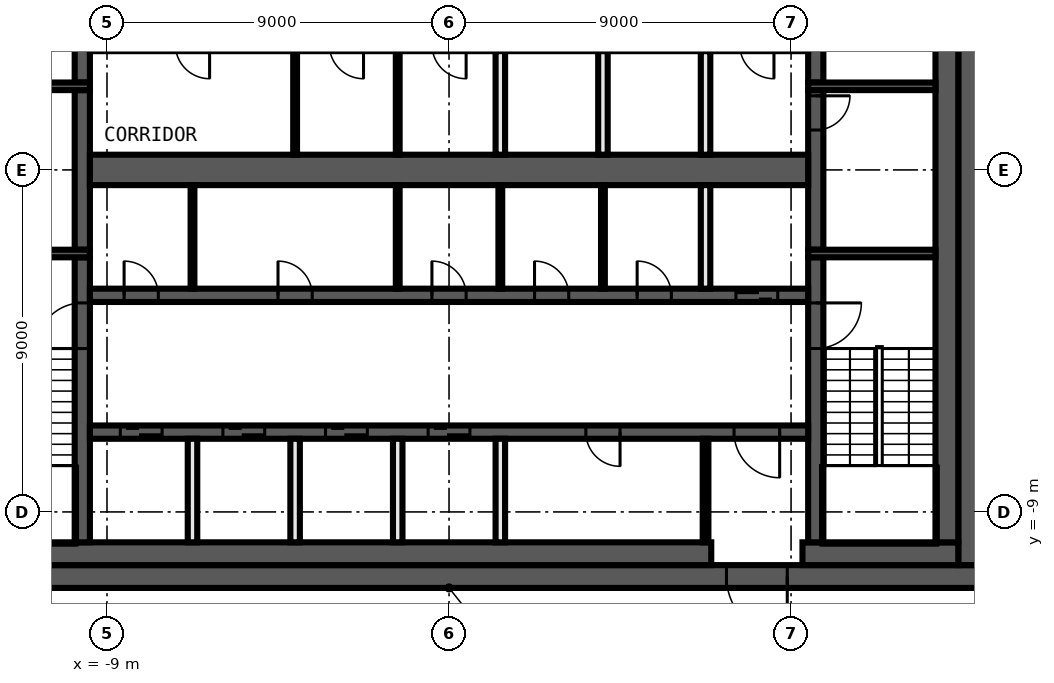
"""IFC4 building model, lengths in metres.
Left out: names, types, materials, properties, quantities, classifications, styles, units other than length and angle.
Written with IfcOpenShell. Run it as: python <this file> out.ifc"""

import sys

from ifc_helpers import new_model, si_unit, direction, frame, frame_2d, origin, place, context, subcontext, project, spatial, rectangle, extrude, element, fill, save


model = new_model("IFC4")
c1 = context("Model", 3, precision=1e-05, world=origin(), true_north=direction((0.0, 1.0)))
c2 = subcontext(c1, "Body", "Model", "MODEL_VIEW")
j1 = project(units=[si_unit("LENGTHUNIT", "METRE"), si_unit("PLANEANGLEUNIT", "RADIAN")], contexts=[c1])
p1 = place(None, origin())
s1 = spatial("IfcSite", under=j1, at=p1, CompositionType="ELEMENT")
p2 = place(p1, origin())
s2 = spatial("IfcBuilding", under=s1, at=p2, CompositionType="ELEMENT")
p3 = place(p2, frame((0.0, 0.0, 294.2)))
s3 = spatial("IfcBuildingStorey", under=s2, at=p3, CompositionType="ELEMENT", Elevation=294.2)
p4 = place(p3, frame((14.0, -10.7, 0.0), z_axis=(0.0, 0.0, 1.0), x_axis=(-1.0, 0.0, 0.0)))
e1 = element("IfcWall", 1, at=p4, inside=s3, PredefinedType="SHEAR", context=c2, shape_type="SweptSolid", body=[
    extrude(rectangle(XDim=28.0, YDim=0.6, at=frame_2d((14.0, 0.0))), origin(), (0.0, 0.0, 1.0), 3.82),
])
p5 = place(p4, frame((5.1, 0.0, 0.0)))
e2 = element("IfcOpeningElement", 2, at=p5, cuts=e1, PredefinedType="OPENING", context=c2, shape_type="SweptSolid", body=[
    extrude(rectangle(XDim=1.6, YDim=2.1, at=frame_2d((0.8, 1.05))), frame((0.0, 0.31, 0.0), z_axis=(0.0, -1.0, 0.0), x_axis=(1.0, 0.0, 0.0)), (0.0, 0.0, 1.0), 0.62),
])
p6 = place(p3, frame((13.7, 10.4, 0.0), z_axis=(0.0, 0.0, 1.0), x_axis=(0.0, -1.0, 0.0)))
e3 = element("IfcWall", 3, at=p6, inside=s3, PredefinedType="SHEAR", context=c2, shape_type="SweptSolid", body=[
    extrude(rectangle(XDim=20.8, YDim=0.6, at=frame_2d((10.4, 0.0))), origin(), (0.0, 0.0, 1.0), 3.82),
])
p7 = place(p3, frame((13.4, -10.1, 0.0), z_axis=(0.0, 0.0, 1.0), x_axis=(-1.0, 0.0, 0.0)))
e4 = element("IfcWall", 4, at=p7, inside=s3, PredefinedType="SHEAR", context=c2, shape_type="SweptSolid", body=[
    extrude(rectangle(XDim=4.1, YDim=0.6, at=frame_2d((2.05, 0.0))), origin(), (0.0, 0.0, 1.0), 3.82),
])
p8 = place(p3, frame((6.9, -10.1, 0.0), z_axis=(0.0, 0.0, 1.0), x_axis=(-1.0, 0.0, 0.0)))
e5 = element("IfcWall", 5, at=p8, inside=s3, PredefinedType="SHEAR", context=c2, shape_type="SweptSolid", body=[
    extrude(rectangle(XDim=20.3, YDim=0.6, at=frame_2d((10.15, 0.0))), origin(), (0.0, 0.0, 1.0), 3.82),
])
p9 = place(p3, frame((13.1, 9.8, 0.0), z_axis=(0.0, 0.0, 1.0), x_axis=(0.0, -1.0, 0.0)))
e6 = element("IfcWall", 6, at=p9, inside=s3, PredefinedType="SHEAR", context=c2, shape_type="SweptSolid", body=[
    extrude(rectangle(XDim=19.6, YDim=0.6, at=frame_2d((9.8, 0.0))), origin(), (0.0, 0.0, 1.0), 3.82),
])
p10 = place(p3, frame((9.65, -2.3, 0.0), z_axis=(0.0, 0.0, 1.0), x_axis=(0.0, -1.0, 0.0)))
e7 = element("IfcWall", 7, at=p10, inside=s3, PredefinedType="SHEAR", context=c2, shape_type="SweptSolid", body=[
    extrude(rectangle(XDim=7.5, YDim=0.4, at=frame_2d((3.75, 0.0))), origin(), (0.0, 0.0, 1.0), 3.82),
])
p11 = place(p10, frame((1.2, 0.0, 0.0)))
e8 = element("IfcOpeningElement", 8, at=p11, cuts=e7, PredefinedType="OPENING", context=c2, shape_type="SweptSolid", body=[
    extrude(rectangle(XDim=1.2, YDim=2.1, at=frame_2d((0.6, 1.05))), frame((0.0, 0.21, 0.0), z_axis=(0.0, -1.0, 0.0), x_axis=(1.0, 0.0, 0.0)), (0.0, 0.0, 1.0), 0.42),
])
p12 = place(p3, frame((9.65, 2.1, 0.0), z_axis=(0.0, 0.0, 1.0), x_axis=(0.0, -1.0, 0.0)))
e9 = element("IfcWall", 9, at=p12, inside=s3, PredefinedType="SHEAR", context=c2, shape_type="SweptSolid", body=[
    extrude(rectangle(XDim=4.2, YDim=0.4, at=frame_2d((2.1, 0.0))), origin(), (0.0, 0.0, 1.0), 3.82),
])
p13 = place(p12, frame((0.15, 0.0, 0.0)))
e10 = element("IfcOpeningElement", 10, at=p13, cuts=e9, PredefinedType="OPENING", context=c2, shape_type="SweptSolid", body=[
    extrude(rectangle(XDim=0.9, YDim=2.1, at=frame_2d((0.45, 1.05))), frame((0.0, 0.21, 0.0), z_axis=(0.0, -1.0, 0.0), x_axis=(1.0, 0.0, 0.0)), (0.0, 0.0, 1.0), 0.42),
])
p14 = place(p3, frame((9.65, 9.8, 0.0), z_axis=(0.0, 0.0, 1.0), x_axis=(0.0, -1.0, 0.0)))
e11 = element("IfcWall", 11, at=p14, inside=s3, PredefinedType="SHEAR", context=c2, shape_type="SweptSolid", body=[
    extrude(rectangle(XDim=7.5, YDim=0.4, at=frame_2d((3.75, 0.0))), origin(), (0.0, 0.0, 1.0), 3.82),
])
p15 = place(p14, frame((5.1, 0.0, 0.0)))
e12 = element("IfcOpeningElement", 12, at=p15, cuts=e11, PredefinedType="OPENING", context=c2, shape_type="SweptSolid", body=[
    extrude(rectangle(XDim=1.2, YDim=2.1, at=frame_2d((0.6, 1.05))), frame((0.0, 0.21, 0.0), z_axis=(0.0, -1.0, 0.0), x_axis=(1.0, 0.0, 0.0)), (0.0, 0.0, 1.0), 0.42),
])
p16 = place(p3, frame((-9.65, -9.8, 0.0), z_axis=(0.0, 0.0, 1.0), x_axis=(0.0, 1.0, 0.0)))
e13 = element("IfcWall", 13, at=p16, inside=s3, PredefinedType="SHEAR", context=c2, shape_type="SweptSolid", body=[
    extrude(rectangle(XDim=7.5, YDim=0.4, at=frame_2d((3.75, 0.0))), origin(), (0.0, 0.0, 1.0), 3.82),
])
p17 = place(p16, frame((5.1, 0.0, 0.0)))
e14 = element("IfcOpeningElement", 14, at=p17, cuts=e13, PredefinedType="OPENING", context=c2, shape_type="SweptSolid", body=[
    extrude(rectangle(XDim=1.2, YDim=2.1, at=frame_2d((0.6, 1.05))), frame((0.0, 0.21, 0.0), z_axis=(0.0, -1.0, 0.0), x_axis=(1.0, 0.0, 0.0)), (0.0, 0.0, 1.0), 0.42),
])
p18 = place(p3, frame((-9.65, -2.1, 0.0), z_axis=(0.0, 0.0, 1.0), x_axis=(0.0, 1.0, 0.0)))
e15 = element("IfcWall", 15, at=p18, inside=s3, PredefinedType="SHEAR", context=c2, shape_type="SweptSolid", body=[
    extrude(rectangle(XDim=4.2, YDim=0.4, at=frame_2d((2.1, 0.0))), origin(), (0.0, 0.0, 1.0), 3.82),
])
p19 = place(p3, frame((-9.65, 2.3, 0.0), z_axis=(0.0, 0.0, 1.0), x_axis=(0.0, 1.0, 0.0)))
e16 = element("IfcWall", 16, at=p19, inside=s3, PredefinedType="SHEAR", context=c2, shape_type="SweptSolid", body=[
    extrude(rectangle(XDim=7.5, YDim=0.4, at=frame_2d((3.75, 0.0))), origin(), (0.0, 0.0, 1.0), 3.82),
])
p20 = place(p19, frame((1.2, 0.0, 0.0)))
e17 = element("IfcOpeningElement", 17, at=p20, cuts=e16, PredefinedType="OPENING", context=c2, shape_type="SweptSolid", body=[
    extrude(rectangle(XDim=1.2, YDim=2.1, at=frame_2d((0.6, 1.05))), frame((0.0, 0.21, 0.0), z_axis=(0.0, -1.0, 0.0), x_axis=(1.0, 0.0, 0.0)), (0.0, 0.0, 1.0), 0.42),
])
for number, where, z_axis, x_axis in (
    (18, (9.45, 2.2, 0.0), (0.0, 0.0, 1.0), (1.0, 0.0, 0.0)),
    (19, (-9.45, 2.2, 0.0), (0.0, 0.0, 1.0), (-1.0, 0.0, 0.0)),
    (20, (9.45, -2.2, 0.0), (0.0, 0.0, 1.0), (1.0, 0.0, 0.0)),
    (21, (-9.45, -2.2, 0.0), (0.0, 0.0, 1.0), (-1.0, 0.0, 0.0)),
):
    element("IfcWall", number, at=place(p3, frame(where, z_axis=z_axis, x_axis=x_axis)), inside=s3, PredefinedType="SHEAR", context=c2, shape_type="SweptSolid", body=[
        extrude(rectangle(XDim=3.35, YDim=0.2, at=frame_2d((1.675, 0.0))), origin(), (0.0, 0.0, 1.0), 3.82),
    ])
p21 = place(p3, frame((-9.45, -3.3, 0.0), z_axis=(0.0, 0.0, 1.0), x_axis=(1.0, 0.0, 0.0)))
e22 = element("IfcWall", 22, at=p21, inside=s3, PredefinedType="SHEAR", context=c2, shape_type="SweptSolid", body=[
    extrude(rectangle(XDim=18.9, YDim=0.35, at=frame_2d((9.45, 0.0))), origin(), (0.0, 0.0, 1.0), 3.82),
])
p22 = place(p21, frame((17.0, 0.0, 0.0)))
e23 = element("IfcOpeningElement", 23, at=p22, cuts=e22, PredefinedType="OPENING", context=c2, shape_type="SweptSolid", body=[
    extrude(rectangle(XDim=1.1, YDim=2.1, at=frame_2d((0.55, 1.05))), frame((0.0, 0.185, 0.0), z_axis=(0.0, -1.0, 0.0), x_axis=(1.0, 0.0, 0.0)), (0.0, 0.0, 1.0), 0.37),
])
p23 = place(p21, frame((0.9, 0.0, 0.0)))
e24 = element("IfcOpeningElement", 24, at=p23, cuts=e22, PredefinedType="OPENING", context=c2, shape_type="SweptSolid", body=[
    extrude(rectangle(XDim=0.9, YDim=2.1, at=frame_2d((0.45, 1.05))), frame((0.0, 0.185, 0.0), z_axis=(0.0, -1.0, 0.0), x_axis=(1.0, 0.0, 0.0)), (0.0, 0.0, 1.0), 0.37),
])
p24 = place(p21, frame((4.95, 0.0, 0.0)))
e25 = element("IfcOpeningElement", 25, at=p24, cuts=e22, PredefinedType="OPENING", context=c2, shape_type="SweptSolid", body=[
    extrude(rectangle(XDim=0.9, YDim=2.1, at=frame_2d((0.45, 1.05))), frame((0.0, 0.185, 0.0), z_axis=(0.0, -1.0, 0.0), x_axis=(1.0, 0.0, 0.0)), (0.0, 0.0, 1.0), 0.37),
])
p25 = place(p21, frame((9.0, 0.0, 0.0)))
e26 = element("IfcOpeningElement", 26, at=p25, cuts=e22, PredefinedType="OPENING", context=c2, shape_type="SweptSolid", body=[
    extrude(rectangle(XDim=0.9, YDim=2.1, at=frame_2d((0.45, 1.05))), frame((0.0, 0.185, 0.0), z_axis=(0.0, -1.0, 0.0), x_axis=(1.0, 0.0, 0.0)), (0.0, 0.0, 1.0), 0.37),
])
p26 = place(p21, frame((11.7, 0.0, 0.0)))
e27 = element("IfcOpeningElement", 27, at=p26, cuts=e22, PredefinedType="OPENING", context=c2, shape_type="SweptSolid", body=[
    extrude(rectangle(XDim=0.9, YDim=2.1, at=frame_2d((0.45, 1.05))), frame((0.0, 0.185, 0.0), z_axis=(0.0, -1.0, 0.0), x_axis=(1.0, 0.0, 0.0)), (0.0, 0.0, 1.0), 0.37),
])
p27 = place(p21, frame((14.4, 0.0, 0.0)))
e28 = element("IfcOpeningElement", 28, at=p27, cuts=e22, PredefinedType="OPENING", context=c2, shape_type="SweptSolid", body=[
    extrude(rectangle(XDim=0.9, YDim=2.1, at=frame_2d((0.45, 1.05))), frame((0.0, 0.185, 0.0), z_axis=(0.0, -1.0, 0.0), x_axis=(1.0, 0.0, 0.0)), (0.0, 0.0, 1.0), 0.37),
])
p28 = place(p3, frame((9.45, -6.9, 0.0), z_axis=(0.0, 0.0, 1.0), x_axis=(-1.0, 0.0, 0.0)))
e29 = element("IfcWall", 29, at=p28, inside=s3, PredefinedType="SHEAR", context=c2, shape_type="SweptSolid", body=[
    extrude(rectangle(XDim=18.9, YDim=0.35, at=frame_2d((9.45, 0.0))), origin(), (0.0, 0.0, 1.0), 3.82),
])
p29 = place(p28, frame((17.0, 0.0, 0.0)))
e30 = element("IfcOpeningElement", 30, at=p29, cuts=e29, PredefinedType="OPENING", context=c2, shape_type="SweptSolid", body=[
    extrude(rectangle(XDim=1.1, YDim=2.1, at=frame_2d((0.55, 1.05))), frame((0.0, 0.185, 0.0), z_axis=(0.0, -1.0, 0.0), x_axis=(1.0, 0.0, 0.0)), (0.0, 0.0, 1.0), 0.37),
])
p30 = place(p28, frame((14.3, 0.0, 0.0)))
e31 = element("IfcOpeningElement", 31, at=p30, cuts=e29, PredefinedType="OPENING", context=c2, shape_type="SweptSolid", body=[
    extrude(rectangle(XDim=1.1, YDim=2.1, at=frame_2d((0.55, 1.05))), frame((0.0, 0.185, 0.0), z_axis=(0.0, -1.0, 0.0), x_axis=(1.0, 0.0, 0.0)), (0.0, 0.0, 1.0), 0.37),
])
p31 = place(p28, frame((11.6, 0.0, 0.0)))
e32 = element("IfcOpeningElement", 32, at=p31, cuts=e29, PredefinedType="OPENING", context=c2, shape_type="SweptSolid", body=[
    extrude(rectangle(XDim=1.1, YDim=2.1, at=frame_2d((0.55, 1.05))), frame((0.0, 0.185, 0.0), z_axis=(0.0, -1.0, 0.0), x_axis=(1.0, 0.0, 0.0)), (0.0, 0.0, 1.0), 0.37),
])
p32 = place(p28, frame((8.9, 0.0, 0.0)))
e33 = element("IfcOpeningElement", 33, at=p32, cuts=e29, PredefinedType="OPENING", context=c2, shape_type="SweptSolid", body=[
    extrude(rectangle(XDim=1.1, YDim=2.1, at=frame_2d((0.55, 1.05))), frame((0.0, 0.185, 0.0), z_axis=(0.0, -1.0, 0.0), x_axis=(1.0, 0.0, 0.0)), (0.0, 0.0, 1.0), 0.37),
])
p33 = place(p28, frame((0.75, 0.0, 0.0)))
e34 = element("IfcOpeningElement", 34, at=p33, cuts=e29, PredefinedType="OPENING", context=c2, shape_type="SweptSolid", body=[
    extrude(rectangle(XDim=1.2, YDim=2.1, at=frame_2d((0.6, 1.05))), frame((0.0, 0.185, 0.0), z_axis=(0.0, -1.0, 0.0), x_axis=(1.0, 0.0, 0.0)), (0.0, 0.0, 1.0), 0.37),
])
p34 = place(p28, frame((4.95, 0.0, 0.0)))
e35 = element("IfcOpeningElement", 35, at=p34, cuts=e29, PredefinedType="OPENING", context=c2, shape_type="SweptSolid", body=[
    extrude(rectangle(XDim=0.9, YDim=2.1, at=frame_2d((0.45, 1.05))), frame((0.0, 0.185, 0.0), z_axis=(0.0, -1.0, 0.0), x_axis=(1.0, 0.0, 0.0)), (0.0, 0.0, 1.0), 0.37),
])
p35 = place(p3, frame((-9.45, 0.0, 0.0), z_axis=(0.0, 0.0, 1.0), x_axis=(1.0, 0.0, 0.0)))
e36 = element("IfcWall", 36, at=p35, inside=s3, PredefinedType="SHEAR", context=c2, shape_type="SweptSolid", body=[
    extrude(rectangle(XDim=18.9, YDim=0.8, at=frame_2d((9.45, 0.0))), origin(), (0.0, 0.0, 1.0), 3.82),
])
p36 = place(p3, frame((6.75, -9.8, 0.0), z_axis=(0.0, 0.0, 1.0), x_axis=(0.0, 1.0, 0.0)))
e37 = element("IfcWall", 37, at=p36, inside=s3, PredefinedType="PARTITIONING", context=c2, shape_type="SweptSolid", body=[
    extrude(rectangle(XDim=2.725, YDim=0.15, at=frame_2d((1.363, 0.0))), origin(), (0.0, 0.0, 1.0), 3.82),
])
for number, where, z_axis, x_axis in (
    (38, (6.75, -3.125, 0.0), (0.0, 0.0, 1.0), (0.0, 1.0, 0.0)),
    (39, (6.75, 0.4, 0.0), (0.0, 0.0, 1.0), (0.0, 1.0, 0.0)),
):
    element("IfcWall", number, at=place(p3, frame(where, z_axis=z_axis, x_axis=x_axis)), inside=s3, PredefinedType="SOLIDWALL", context=c2, shape_type="SweptSolid", body=[
        extrude(rectangle(XDim=2.725, YDim=0.25, at=frame_2d((1.363, 0.0))), origin(), (0.0, 0.0, 1.0), 3.82),
    ])
p37 = place(p3, frame((4.05, -3.125, 0.0), z_axis=(0.0, 0.0, 1.0), x_axis=(0.0, 1.0, 0.0)))
e40 = element("IfcWall", 40, at=p37, inside=s3, PredefinedType="PARTITIONING", context=c2, shape_type="SweptSolid", body=[
    extrude(rectangle(XDim=2.725, YDim=0.1, at=frame_2d((1.363, 0.0))), origin(), (0.0, 0.0, 1.0), 3.82),
])
p38 = place(p3, frame((4.05, 0.4, 0.0), z_axis=(0.0, 0.0, 1.0), x_axis=(0.0, 1.0, 0.0)))
e41 = element("IfcWall", 41, at=p38, inside=s3, PredefinedType="SOLIDWALL", context=c2, shape_type="SweptSolid", body=[
    extrude(rectangle(XDim=2.725, YDim=0.25, at=frame_2d((1.363, 0.0))), origin(), (0.0, 0.0, 1.0), 3.82),
])
p39 = place(p3, frame((1.35, -3.125, 0.0), z_axis=(0.0, 0.0, 1.0), x_axis=(0.0, 1.0, 0.0)))
e42 = element("IfcWall", 42, at=p39, inside=s3, PredefinedType="PARTITIONING", context=c2, shape_type="SweptSolid", body=[
    extrude(rectangle(XDim=2.725, YDim=0.1, at=frame_2d((1.363, 0.0))), origin(), (0.0, 0.0, 1.0), 3.82),
])
for number, where, z_axis, x_axis in (
    (43, (1.35, -9.8, 0.0), (0.0, 0.0, 1.0), (0.0, 1.0, 0.0)),
    (44, (1.35, 0.4, 0.0), (0.0, 0.0, 1.0), (0.0, 1.0, 0.0)),
):
    element("IfcWall", number, at=place(p3, frame(where, z_axis=z_axis, x_axis=x_axis)), inside=s3, PredefinedType="SOLIDWALL", context=c2, shape_type="SweptSolid", body=[
        extrude(rectangle(XDim=2.725, YDim=0.25, at=frame_2d((1.363, 0.0))), origin(), (0.0, 0.0, 1.0), 3.82),
    ])
for number, where, z_axis, x_axis in (
    (45, (-1.35, -3.125, 0.0), (0.0, 0.0, 1.0), (0.0, 1.0, 0.0)),
    (46, (-1.35, 0.4, 0.0), (0.0, 0.0, 1.0), (0.0, 1.0, 0.0)),
):
    element("IfcWall", number, at=place(p3, frame(where, z_axis=z_axis, x_axis=x_axis)), inside=s3, PredefinedType="PARTITIONING", context=c2, shape_type="SweptSolid", body=[
        extrude(rectangle(XDim=2.725, YDim=0.1, at=frame_2d((1.363, 0.0))), origin(), (0.0, 0.0, 1.0), 3.82),
    ])
p40 = place(p3, frame((-1.35, -9.8, 0.0), z_axis=(0.0, 0.0, 1.0), x_axis=(0.0, 1.0, 0.0)))
e47 = element("IfcWall", 47, at=p40, inside=s3, PredefinedType="SOLIDWALL", context=c2, shape_type="SweptSolid", body=[
    extrude(rectangle(XDim=2.725, YDim=0.25, at=frame_2d((1.363, 0.0))), origin(), (0.0, 0.0, 1.0), 3.82),
])
p41 = place(p3, frame((-4.05, 0.4, 0.0), z_axis=(0.0, 0.0, 1.0), x_axis=(0.0, 1.0, 0.0)))
e48 = element("IfcWall", 48, at=p41, inside=s3, PredefinedType="PARTITIONING", context=c2, shape_type="SweptSolid", body=[
    extrude(rectangle(XDim=2.725, YDim=0.1, at=frame_2d((1.363, 0.0))), origin(), (0.0, 0.0, 1.0), 3.82),
])
p42 = place(p3, frame((-4.05, -9.8, 0.0), z_axis=(0.0, 0.0, 1.0), x_axis=(0.0, 1.0, 0.0)))
e49 = element("IfcWall", 49, at=p42, inside=s3, PredefinedType="SOLIDWALL", context=c2, shape_type="SweptSolid", body=[
    extrude(rectangle(XDim=2.725, YDim=0.25, at=frame_2d((1.363, 0.0))), origin(), (0.0, 0.0, 1.0), 3.82),
])
p43 = place(p3, frame((-6.75, -3.125, 0.0), z_axis=(0.0, 0.0, 1.0), x_axis=(0.0, 1.0, 0.0)))
e50 = element("IfcWall", 50, at=p43, inside=s3, PredefinedType="PARTITIONING", context=c2, shape_type="SweptSolid", body=[
    extrude(rectangle(XDim=2.725, YDim=0.1, at=frame_2d((1.363, 0.0))), origin(), (0.0, 0.0, 1.0), 3.82),
])
p44 = place(p3, frame((-6.75, -9.8, 0.0), z_axis=(0.0, 0.0, 1.0), x_axis=(0.0, 1.0, 0.0)))
e51 = element("IfcWall", 51, at=p44, inside=s3, PredefinedType="SOLIDWALL", context=c2, shape_type="SweptSolid", body=[
    extrude(rectangle(XDim=2.725, YDim=0.25, at=frame_2d((1.363, 0.0))), origin(), (0.0, 0.0, 1.0), 3.82),
])
p45 = place(p13, origin())
e52 = element("IfcDoor", 52, at=p45, inside=s3, OperationType="SINGLE_SWING_RIGHT", PredefinedType="DOOR", context=c2, shape_type="SweptSolid", body=[
    extrude(rectangle(XDim=0.9, YDim=2.1, at=frame_2d((0.45, 1.05))), frame((0.0, 0.025, 0.0), z_axis=(0.0, -1.0, 0.0), x_axis=(1.0, 0.0, 0.0)), (0.0, 0.0, 1.0), 0.05),
])
fill(e10, e52)
p46 = place(p22, origin())
e53 = element("IfcDoor", 53, at=p46, inside=s3, OperationType="DOUBLE_DOOR_SLIDING", PredefinedType="DOOR", context=c2, shape_type="SweptSolid", body=[
    extrude(rectangle(XDim=1.1, YDim=2.1, at=frame_2d((0.55, 1.05))), frame((0.0, 0.025, 0.0), z_axis=(0.0, -1.0, 0.0), x_axis=(1.0, 0.0, 0.0)), (0.0, 0.0, 1.0), 0.05),
])
fill(e23, e53)
p47 = place(p29, origin())
e54 = element("IfcDoor", 54, at=p47, inside=s3, OperationType="DOUBLE_DOOR_SLIDING", PredefinedType="DOOR", context=c2, shape_type="SweptSolid", body=[
    extrude(rectangle(XDim=1.1, YDim=2.1, at=frame_2d((0.55, 1.05))), frame((0.0, 0.025, 0.0), z_axis=(0.0, -1.0, 0.0), x_axis=(1.0, 0.0, 0.0)), (0.0, 0.0, 1.0), 0.05),
])
fill(e30, e54)
p48 = place(p30, origin())
e55 = element("IfcDoor", 55, at=p48, inside=s3, OperationType="DOUBLE_DOOR_SLIDING", PredefinedType="DOOR", context=c2, shape_type="SweptSolid", body=[
    extrude(rectangle(XDim=1.1, YDim=2.1, at=frame_2d((0.55, 1.05))), frame((0.0, 0.025, 0.0), z_axis=(0.0, -1.0, 0.0), x_axis=(1.0, 0.0, 0.0)), (0.0, 0.0, 1.0), 0.05),
])
fill(e31, e55)
p49 = place(p31, origin())
e56 = element("IfcDoor", 56, at=p49, inside=s3, OperationType="DOUBLE_DOOR_SLIDING", PredefinedType="DOOR", context=c2, shape_type="SweptSolid", body=[
    extrude(rectangle(XDim=1.1, YDim=2.1, at=frame_2d((0.55, 1.05))), frame((0.0, 0.025, 0.0), z_axis=(0.0, -1.0, 0.0), x_axis=(1.0, 0.0, 0.0)), (0.0, 0.0, 1.0), 0.05),
])
fill(e32, e56)
p50 = place(p32, origin())
e57 = element("IfcDoor", 57, at=p50, inside=s3, OperationType="DOUBLE_DOOR_SLIDING", PredefinedType="DOOR", context=c2, shape_type="SweptSolid", body=[
    extrude(rectangle(XDim=1.1, YDim=2.1, at=frame_2d((0.55, 1.05))), frame((0.0, 0.025, 0.0), z_axis=(0.0, -1.0, 0.0), x_axis=(1.0, 0.0, 0.0)), (0.0, 0.0, 1.0), 0.05),
])
fill(e33, e57)
p51 = place(p5, origin())
e58 = element("IfcDoor", 58, at=p51, inside=s3, OperationType="DOUBLE_DOOR_SINGLE_SWING", PredefinedType="DOOR", context=c2, shape_type="SweptSolid", body=[
    extrude(rectangle(XDim=1.6, YDim=2.1, at=frame_2d((0.8, 1.05))), frame((0.0, 0.025, 0.0), z_axis=(0.0, -1.0, 0.0), x_axis=(1.0, 0.0, 0.0)), (0.0, 0.0, 1.0), 0.05),
])
fill(e2, e58)
p52 = place(p33, origin())
e59 = element("IfcDoor", 59, at=p52, inside=s3, OperationType="SINGLE_SWING_LEFT", PredefinedType="DOOR", context=c2, shape_type="SweptSolid", body=[
    extrude(rectangle(XDim=1.2, YDim=2.1, at=frame_2d((0.6, 1.05))), frame((0.0, 0.025, 0.0), z_axis=(0.0, -1.0, 0.0), x_axis=(1.0, 0.0, 0.0)), (0.0, 0.0, 1.0), 0.05),
])
fill(e34, e59)
p53 = place(p23, origin())
e60 = element("IfcDoor", 60, at=p53, inside=s3, OperationType="SINGLE_SWING_LEFT", PredefinedType="DOOR", context=c2, shape_type="SweptSolid", body=[
    extrude(rectangle(XDim=0.9, YDim=2.1, at=frame_2d((0.45, 1.05))), frame((0.0, 0.025, 0.0), z_axis=(0.0, -1.0, 0.0), x_axis=(1.0, 0.0, 0.0)), (0.0, 0.0, 1.0), 0.05),
])
fill(e24, e60)
p54 = place(p24, origin())
e61 = element("IfcDoor", 61, at=p54, inside=s3, OperationType="SINGLE_SWING_RIGHT", PredefinedType="DOOR", context=c2, shape_type="SweptSolid", body=[
    extrude(rectangle(XDim=0.9, YDim=2.1, at=frame_2d((0.45, 1.05))), frame((0.0, 0.025, 0.0), z_axis=(0.0, -1.0, 0.0), x_axis=(1.0, 0.0, 0.0)), (0.0, 0.0, 1.0), 0.05),
])
fill(e25, e61)
p55 = place(p25, origin())
e62 = element("IfcDoor", 62, at=p55, inside=s3, OperationType="SINGLE_SWING_LEFT", PredefinedType="DOOR", context=c2, shape_type="SweptSolid", body=[
    extrude(rectangle(XDim=0.9, YDim=2.1, at=frame_2d((0.45, 1.05))), frame((0.0, 0.025, 0.0), z_axis=(0.0, -1.0, 0.0), x_axis=(1.0, 0.0, 0.0)), (0.0, 0.0, 1.0), 0.05),
])
fill(e26, e62)
p56 = place(p26, origin())
e63 = element("IfcDoor", 63, at=p56, inside=s3, OperationType="SINGLE_SWING_RIGHT", PredefinedType="DOOR", context=c2, shape_type="SweptSolid", body=[
    extrude(rectangle(XDim=0.9, YDim=2.1, at=frame_2d((0.45, 1.05))), frame((0.0, 0.025, 0.0), z_axis=(0.0, -1.0, 0.0), x_axis=(1.0, 0.0, 0.0)), (0.0, 0.0, 1.0), 0.05),
])
fill(e27, e63)
p57 = place(p27, origin())
e64 = element("IfcDoor", 64, at=p57, inside=s3, OperationType="SINGLE_SWING_LEFT", PredefinedType="DOOR", context=c2, shape_type="SweptSolid", body=[
    extrude(rectangle(XDim=0.9, YDim=2.1, at=frame_2d((0.45, 1.05))), frame((0.0, 0.025, 0.0), z_axis=(0.0, -1.0, 0.0), x_axis=(1.0, 0.0, 0.0)), (0.0, 0.0, 1.0), 0.05),
])
fill(e28, e64)
p58 = place(p34, origin())
e65 = element("IfcDoor", 65, at=p58, inside=s3, OperationType="SINGLE_SWING_RIGHT", PredefinedType="DOOR", context=c2, shape_type="SweptSolid", body=[
    extrude(rectangle(XDim=0.9, YDim=2.1, at=frame_2d((0.45, 1.05))), frame((0.0, 0.025, 0.0), z_axis=(0.0, -1.0, 0.0), x_axis=(1.0, 0.0, 0.0)), (0.0, 0.0, 1.0), 0.05),
])
fill(e35, e65)
p59 = place(p11, origin())
e66 = element("IfcDoor", 66, at=p59, inside=s3, OperationType="SINGLE_SWING_RIGHT", PredefinedType="DOOR", context=c2, shape_type="SweptSolid", body=[
    extrude(rectangle(XDim=1.2, YDim=2.1, at=frame_2d((0.6, 1.05))), frame((0.0, 0.025, 0.0), z_axis=(0.0, -1.0, 0.0), x_axis=(1.0, 0.0, 0.0)), (0.0, 0.0, 1.0), 0.05),
])
fill(e8, e66)
p60 = place(p17, origin())
e67 = element("IfcDoor", 67, at=p60, inside=s3, OperationType="SINGLE_SWING_LEFT", PredefinedType="DOOR", context=c2, shape_type="SweptSolid", body=[
    extrude(rectangle(XDim=1.2, YDim=2.1, at=frame_2d((0.6, 1.05))), frame((0.0, 0.025, 0.0), z_axis=(0.0, -1.0, 0.0), x_axis=(1.0, 0.0, 0.0)), (0.0, 0.0, 1.0), 0.05),
])
fill(e14, e67)
save(model, sys.argv[1])
